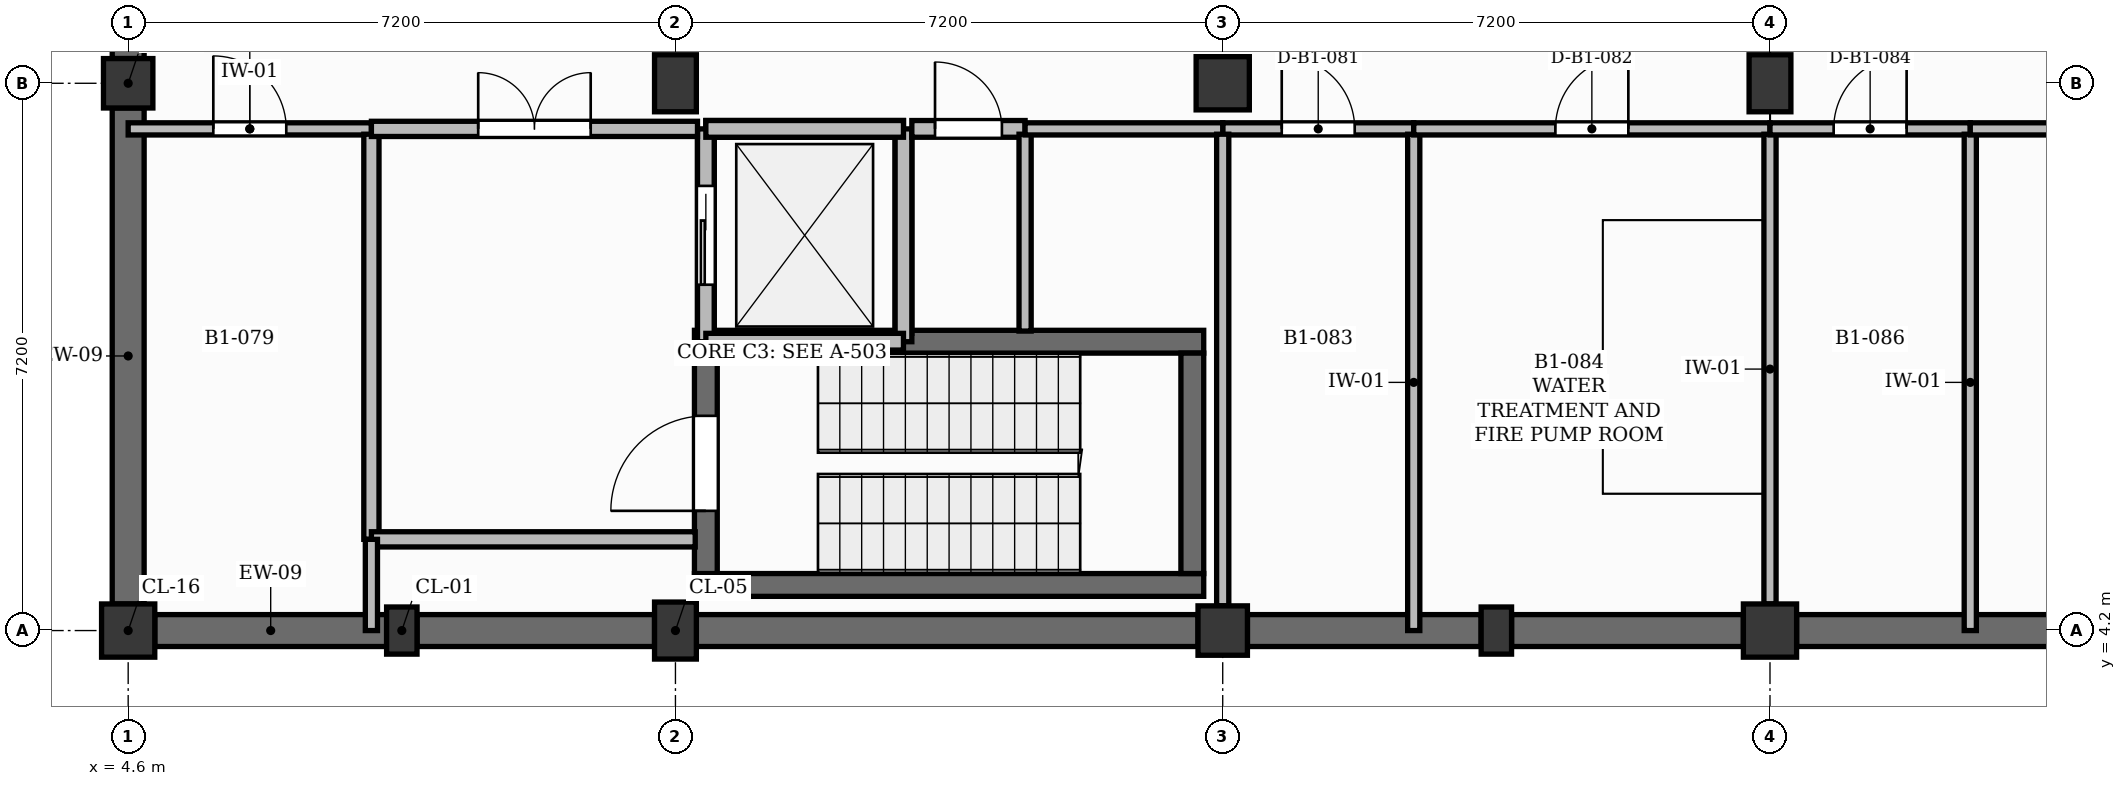
"""IFC4 building model, lengths in metres.
Left out: names, types, materials, properties, quantities, classifications, styles, units other than length and angle.
Written with IfcOpenShell. Run it as: python <this file> out.ifc"""

import sys

from ifc_helpers import new_model, si_unit, direction, frame, frame_2d, origin, origin_2d, place, context, subcontext, project, spatial, rectangle, extrude, element, fill, save


model = new_model("IFC4")
c1 = context("Model", 3, precision=1e-05, world=origin(), true_north=direction((0.0, 1.0)))
c2 = subcontext(c1, "Body", "Model", "MODEL_VIEW")
j1 = project(units=[si_unit("LENGTHUNIT", "METRE"), si_unit("PLANEANGLEUNIT", "RADIAN")], contexts=[c1])
p1 = place(None, origin())
s1 = spatial("IfcSite", under=j1, at=p1, CompositionType="ELEMENT")
p2 = place(p1, origin())
s2 = spatial("IfcBuilding", under=s1, at=p2, CompositionType="ELEMENT")
p3 = place(p2, frame((0.0, 0.0, -4.5)))
s3 = spatial("IfcBuildingStorey", under=s2, at=p3, CompositionType="ELEMENT", Elevation=-4.5)
p4 = place(p3, frame((4.6, 4.2, 0.0), z_axis=(0.0, 0.0, 1.0), x_axis=(1.0, 0.0, 0.0)))
e1 = element("IfcColumn", 1, at=p4, inside=s3, PredefinedType="COLUMN", context=c2, shape_type="SweptSolid", body=[
    extrude(rectangle(XDim=0.7, YDim=0.7, at=origin_2d()), origin(), (0.0, 0.0, 1.0), 4.2),
])
p5 = place(p3, frame((4.6, 11.4, 0.0), z_axis=(0.0, 0.0, 1.0), x_axis=(1.0, 0.0, 0.0)))
e2 = element("IfcColumn", 2, at=p5, inside=s3, PredefinedType="COLUMN", context=c2, shape_type="SweptSolid", body=[
    extrude(rectangle(XDim=0.65, YDim=0.65, at=origin_2d()), origin(), (0.0, 0.0, 1.0), 4.2),
])
for number, where, z_axis, x_axis in (
    (3, (11.8, 4.2, 0.0), (0.0, 0.0, 1.0), (1.0, 0.0, 0.0)),
    (4, (11.8, 11.4, 0.0), (0.0, 0.0, 1.0), (1.0, 0.0, 0.0)),
):
    element("IfcColumn", number, at=place(p3, frame(where, z_axis=z_axis, x_axis=x_axis)), inside=s3, PredefinedType="COLUMN", context=c2, shape_type="SweptSolid", body=[
        extrude(rectangle(XDim=0.55, YDim=0.75, at=origin_2d()), origin(), (0.0, 0.0, 1.0), 4.2),
    ])
p6 = place(p3, frame((19.0, 4.2, 0.0), z_axis=(0.0, 0.0, 1.0), x_axis=(1.0, 0.0, 0.0)))
e5 = element("IfcColumn", 5, at=p6, inside=s3, PredefinedType="COLUMN", context=c2, shape_type="SweptSolid", body=[
    extrude(rectangle(XDim=0.65, YDim=0.65, at=origin_2d()), origin(), (0.0, 0.0, 1.0), 4.2),
])
for number, where, z_axis, x_axis in (
    (6, (19.0, 11.4, 0.0), (0.0, 0.0, 1.0), (1.0, 0.0, 0.0)),
    (7, (26.2, 4.2, 0.0), (0.0, 0.0, 1.0), (1.0, 0.0, 0.0)),
):
    element("IfcColumn", number, at=place(p3, frame(where, z_axis=z_axis, x_axis=x_axis)), inside=s3, PredefinedType="COLUMN", context=c2, shape_type="SweptSolid", body=[
        extrude(rectangle(XDim=0.7, YDim=0.7, at=origin_2d()), origin(), (0.0, 0.0, 1.0), 4.2),
    ])
p7 = place(p3, frame((26.2, 11.4, 0.0), z_axis=(0.0, 0.0, 1.0), x_axis=(1.0, 0.0, 0.0)))
e8 = element("IfcColumn", 8, at=p7, inside=s3, PredefinedType="COLUMN", context=c2, shape_type="SweptSolid", body=[
    extrude(rectangle(XDim=0.55, YDim=0.75, at=origin_2d()), origin(), (0.0, 0.0, 1.0), 4.2),
])
for number, where, z_axis, x_axis in (
    (9, (8.2, 4.2, 0.0), (0.0, 0.0, 1.0), (1.0, 0.0, 0.0)),
    (10, (22.6, 4.2, 0.0), (0.0, 0.0, 1.0), (1.0, 0.0, 0.0)),
):
    element("IfcColumn", number, at=place(p3, frame(where, z_axis=z_axis, x_axis=x_axis)), inside=s3, PredefinedType="PILASTER", context=c2, shape_type="SweptSolid", body=[
        extrude(rectangle(XDim=0.4, YDim=0.62, at=origin_2d()), origin(), (0.0, 0.0, 1.0), 4.2),
    ])
p8 = place(p3, frame((4.95, 4.2, 0.0), z_axis=(0.0, 0.0, 1.0), x_axis=(1.0, 0.0, 0.0)))
e11 = element("IfcWall", 11, at=p8, inside=s3, PredefinedType="USERDEFINED", context=c2, shape_type="SweptSolid", body=[
    extrude(rectangle(XDim=3.05, YDim=0.42, at=frame_2d((1.525, 0.0))), origin(), (0.0, 0.0, 1.0), 4.2),
])
p9 = place(p3, frame((8.4, 4.2, 0.0), z_axis=(0.0, 0.0, 1.0), x_axis=(1.0, 0.0, 0.0)))
e12 = element("IfcWall", 12, at=p9, inside=s3, PredefinedType="USERDEFINED", context=c2, shape_type="SweptSolid", body=[
    extrude(rectangle(XDim=3.125, YDim=0.42, at=frame_2d((1.562, 0.0))), origin(), (0.0, 0.0, 1.0), 4.2),
])
p10 = place(p3, frame((4.6, 4.55, 0.0), z_axis=(0.0, 0.0, 1.0), x_axis=(0.0, 1.0, 0.0)))
e13 = element("IfcWall", 13, at=p10, inside=s3, PredefinedType="USERDEFINED", context=c2, shape_type="SweptSolid", body=[
    extrude(rectangle(XDim=6.525, YDim=0.42, at=frame_2d((3.262, 0.0))), origin(), (0.0, 0.0, 1.0), 4.2),
])
p11 = place(p3, frame((4.6, 11.725, 0.0), z_axis=(0.0, 0.0, 1.0), x_axis=(0.0, 1.0, 0.0)))
e14 = element("IfcWall", 14, at=p11, inside=s3, PredefinedType="USERDEFINED", context=c2, shape_type="SweptSolid", body=[
    extrude(rectangle(XDim=6.55, YDim=0.42, at=frame_2d((3.275, 0.0))), origin(), (0.0, 0.0, 1.0), 4.2),
])
p12 = place(p3, frame((12.075, 4.2, 0.0), z_axis=(0.0, 0.0, 1.0), x_axis=(1.0, 0.0, 0.0)))
e15 = element("IfcWall", 15, at=p12, inside=s3, PredefinedType="USERDEFINED", context=c2, shape_type="SweptSolid", body=[
    extrude(rectangle(XDim=6.6, YDim=0.42, at=frame_2d((3.3, 0.0))), origin(), (0.0, 0.0, 1.0), 4.2),
])
p13 = place(p3, frame((19.325, 4.2, 0.0), z_axis=(0.0, 0.0, 1.0), x_axis=(1.0, 0.0, 0.0)))
e16 = element("IfcWall", 16, at=p13, inside=s3, PredefinedType="USERDEFINED", context=c2, shape_type="SweptSolid", body=[
    extrude(rectangle(XDim=3.075, YDim=0.42, at=frame_2d((1.538, 0.0))), origin(), (0.0, 0.0, 1.0), 4.2),
])
p14 = place(p3, frame((22.8, 4.2, 0.0), z_axis=(0.0, 0.0, 1.0), x_axis=(1.0, 0.0, 0.0)))
e17 = element("IfcWall", 17, at=p14, inside=s3, PredefinedType="USERDEFINED", context=c2, shape_type="SweptSolid", body=[
    extrude(rectangle(XDim=3.05, YDim=0.42, at=frame_2d((1.525, 0.0))), origin(), (0.0, 0.0, 1.0), 4.2),
])
p15 = place(p3, frame((26.55, 4.2, 0.0), z_axis=(0.0, 0.0, 1.0), x_axis=(1.0, 0.0, 0.0)))
e18 = element("IfcWall", 18, at=p15, inside=s3, PredefinedType="USERDEFINED", context=c2, shape_type="SweptSolid", body=[
    extrude(rectangle(XDim=6.525, YDim=0.42, at=frame_2d((3.262, 0.0))), origin(), (0.0, 0.0, 1.0), 4.2),
])
for number, where, z_axis, x_axis in (
    (19, (12.05, 4.8, 0.0), (0.0, 0.0, 1.0), (1.0, 0.0, 0.0)),
    (20, (12.05, 8.0, 0.0), (0.0, 0.0, 1.0), (1.0, 0.0, 0.0)),
):
    element("IfcWall", number, at=place(p3, frame(where, z_axis=z_axis, x_axis=x_axis)), inside=s3, PredefinedType="SHEAR", context=c2, shape_type="SweptSolid", body=[
        extrude(rectangle(XDim=6.7, YDim=0.3, at=frame_2d((3.35, 0.0))), origin(), (0.0, 0.0, 1.0), 4.25),
    ])
p16 = place(p3, frame((12.2, 4.95, 0.0), z_axis=(0.0, 0.0, 1.0), x_axis=(0.0, 1.0, 0.0)))
e21 = element("IfcWall", 21, at=p16, inside=s3, PredefinedType="SHEAR", context=c2, shape_type="SweptSolid", body=[
    extrude(rectangle(XDim=2.9, YDim=0.3, at=frame_2d((1.45, 0.0))), origin(), (0.0, 0.0, 1.0), 4.25),
])
p17 = place(p16, frame((0.825, 0.0, 0.0)))
e22 = element("IfcOpeningElement", 22, at=p17, cuts=e21, PredefinedType="OPENING", context=c2, shape_type="SweptSolid", body=[
    extrude(rectangle(XDim=1.25, YDim=2.15, at=frame_2d((0.625, 1.075))), frame((0.0, 0.16, 0.0), z_axis=(0.0, -1.0, 0.0), x_axis=(1.0, 0.0, 0.0)), (0.0, 0.0, 1.0), 0.32),
])
p18 = place(p3, frame((18.6, 4.95, 0.0), z_axis=(0.0, 0.0, 1.0), x_axis=(0.0, 1.0, 0.0)))
e23 = element("IfcWall", 23, at=p18, inside=s3, PredefinedType="SHEAR", context=c2, shape_type="SweptSolid", body=[
    extrude(rectangle(XDim=2.9, YDim=0.3, at=frame_2d((1.45, 0.0))), origin(), (0.0, 0.0, 1.0), 4.25),
])
p19 = place(p3, frame((12.2, 10.8, 0.0), z_axis=(0.0, 0.0, 1.0), x_axis=(1.0, 0.0, 0.0)))
e24 = element("IfcWall", 24, at=p19, inside=s3, PredefinedType="SOLIDWALL", context=c2, shape_type="SweptSolid", body=[
    extrude(rectangle(XDim=2.6, YDim=0.22, at=frame_2d((1.3, 0.0))), origin(), (0.0, 0.0, 1.0), 4.25),
])
p20 = place(p3, frame((12.2, 8.11, 0.0), z_axis=(0.0, 0.0, 1.0), x_axis=(0.0, 1.0, 0.0)))
e25 = element("IfcWall", 25, at=p20, inside=s3, PredefinedType="SOLIDWALL", context=c2, shape_type="SweptSolid", body=[
    extrude(rectangle(XDim=2.58, YDim=0.22, at=frame_2d((1.29, 0.0))), origin(), (0.0, 0.0, 1.0), 4.25),
])
p21 = place(p20, frame((0.64, 0.0, 0.0)))
e26 = element("IfcOpeningElement", 26, at=p21, cuts=e25, PredefinedType="OPENING", context=c2, shape_type="SweptSolid", body=[
    extrude(rectangle(XDim=1.3, YDim=2.2, at=frame_2d((0.65, 1.1))), frame((0.0, 0.12, 0.0), z_axis=(0.0, -1.0, 0.0), x_axis=(1.0, 0.0, 0.0)), (0.0, 0.0, 1.0), 0.24),
])
p22 = place(p3, frame((14.8, 8.11, 0.0), z_axis=(0.0, 0.0, 1.0), x_axis=(0.0, 1.0, 0.0)))
e27 = element("IfcWall", 27, at=p22, inside=s3, PredefinedType="SOLIDWALL", context=c2, shape_type="SweptSolid", body=[
    extrude(rectangle(XDim=2.58, YDim=0.22, at=frame_2d((1.29, 0.0))), origin(), (0.0, 0.0, 1.0), 4.25),
])
for number, where, z_axis, x_axis in (
    (28, (12.2, 8.0, -0.9), (0.0, 0.0, 1.0), (0.0, 1.0, 0.0)),
    (29, (14.8, 8.0, -0.9), (0.0, 0.0, 1.0), (0.0, 1.0, 0.0)),
):
    element("IfcWall", number, at=place(p3, frame(where, z_axis=z_axis, x_axis=x_axis)), inside=s3, PredefinedType="SOLIDWALL", context=c2, shape_type="SweptSolid", body=[
        extrude(rectangle(XDim=2.8, YDim=0.22, at=frame_2d((1.4, 0.0))), origin(), (0.0, 0.0, 1.0), 0.9),
    ])
for number, where, z_axis, x_axis in (
    (30, (12.2, 8.0, -0.9), (0.0, 0.0, 1.0), (1.0, 0.0, 0.0)),
    (31, (12.2, 10.8, -0.9), (0.0, 0.0, 1.0), (1.0, 0.0, 0.0)),
):
    element("IfcWall", number, at=place(p3, frame(where, z_axis=z_axis, x_axis=x_axis)), inside=s3, PredefinedType="SOLIDWALL", context=c2, shape_type="SweptSolid", body=[
        extrude(rectangle(XDim=2.6, YDim=0.22, at=frame_2d((1.3, 0.0))), origin(), (0.0, 0.0, 1.0), 0.9),
    ])
p23 = place(p3, frame((4.6, 10.8, 0.0), z_axis=(0.0, 0.0, 1.0), x_axis=(1.0, 0.0, 0.0)))
e32 = element("IfcWall", 32, at=p23, inside=s3, PredefinedType="PARTITIONING", context=c2, shape_type="SweptSolid", body=[
    extrude(rectangle(XDim=3.2, YDim=0.16, at=frame_2d((1.6, 0.0))), origin(), (0.0, 0.0, 1.0), 4.08),
])
p24 = place(p23, frame((1.12, 0.0, 0.0)))
e33 = element("IfcOpeningElement", 33, at=p24, cuts=e32, PredefinedType="OPENING", context=c2, shape_type="SweptSolid", body=[
    extrude(rectangle(XDim=0.96, YDim=2.1, at=frame_2d((0.48, 1.05))), frame((0.0, 0.09, 0.0), z_axis=(0.0, -1.0, 0.0), x_axis=(1.0, 0.0, 0.0)), (0.0, 0.0, 1.0), 0.18),
])
p25 = place(p3, frame((7.8, 5.4, 0.0), z_axis=(0.0, 0.0, 1.0), x_axis=(0.0, 1.0, 0.0)))
e34 = element("IfcWall", 34, at=p25, inside=s3, PredefinedType="PARTITIONING", context=c2, shape_type="SweptSolid", body=[
    extrude(rectangle(XDim=5.33, YDim=0.2, at=frame_2d((2.665, 0.0))), origin(), (0.0, 0.0, 1.0), 4.08),
])
p26 = place(p3, frame((7.8, 10.8, 0.0), z_axis=(0.0, 0.0, 1.0), x_axis=(1.0, 0.0, 0.0)))
e35 = element("IfcWall", 35, at=p26, inside=s3, PredefinedType="PARTITIONING", context=c2, shape_type="SweptSolid", body=[
    extrude(rectangle(XDim=4.29, YDim=0.2, at=frame_2d((2.145, 0.0))), origin(), (0.0, 0.0, 1.0), 4.08),
])
p27 = place(p26, frame((1.405, 0.0, 0.0)))
e36 = element("IfcOpeningElement", 36, at=p27, cuts=e35, PredefinedType="OPENING", context=c2, shape_type="SweptSolid", body=[
    extrude(rectangle(XDim=1.48, YDim=2.25, at=frame_2d((0.74, 1.125))), frame((0.0, 0.11, 0.0), z_axis=(0.0, -1.0, 0.0), x_axis=(1.0, 0.0, 0.0)), (0.0, 0.0, 1.0), 0.22),
])
p28 = place(p3, frame((14.91, 10.8, 0.0), z_axis=(0.0, 0.0, 1.0), x_axis=(1.0, 0.0, 0.0)))
e37 = element("IfcWall", 37, at=p28, inside=s3, PredefinedType="SOLIDWALL", context=c2, shape_type="SweptSolid", body=[
    extrude(rectangle(XDim=1.49, YDim=0.22, at=frame_2d((0.745, 0.0))), origin(), (0.0, 0.0, 1.0), 4.08),
])
p29 = place(p28, frame((0.305, 0.0, 0.0)))
e38 = element("IfcOpeningElement", 38, at=p29, cuts=e37, PredefinedType="OPENING", context=c2, shape_type="SweptSolid", body=[
    extrude(rectangle(XDim=0.88, YDim=2.05, at=frame_2d((0.44, 1.025))), frame((0.0, 0.12, 0.0), z_axis=(0.0, -1.0, 0.0), x_axis=(1.0, 0.0, 0.0)), (0.0, 0.0, 1.0), 0.24),
])
p30 = place(p3, frame((19.0, 10.8, 0.0), z_axis=(0.0, 0.0, 1.0), x_axis=(1.0, 0.0, 0.0)))
e39 = element("IfcWall", 39, at=p30, inside=s3, PredefinedType="PARTITIONING", context=c2, shape_type="SweptSolid", body=[
    extrude(rectangle(XDim=2.513, YDim=0.16, at=frame_2d((1.256, 0.0))), origin(), (0.0, 0.0, 1.0), 4.08),
])
p31 = place(p30, frame((0.777, 0.0, 0.0)))
e40 = element("IfcOpeningElement", 40, at=p31, cuts=e39, PredefinedType="OPENING", context=c2, shape_type="SweptSolid", body=[
    extrude(rectangle(XDim=0.96, YDim=2.1, at=frame_2d((0.48, 1.05))), frame((0.0, 0.09, 0.0), z_axis=(0.0, -1.0, 0.0), x_axis=(1.0, 0.0, 0.0)), (0.0, 0.0, 1.0), 0.18),
])
p32 = place(p3, frame((21.513, 4.2, 0.0), z_axis=(0.0, 0.0, 1.0), x_axis=(0.0, 1.0, 0.0)))
e41 = element("IfcWall", 41, at=p32, inside=s3, PredefinedType="PARTITIONING", context=c2, shape_type="SweptSolid", body=[
    extrude(rectangle(XDim=6.53, YDim=0.16, at=frame_2d((3.265, 0.0))), origin(), (0.0, 0.0, 1.0), 4.08),
])
p33 = place(p3, frame((21.513, 10.8, 0.0), z_axis=(0.0, 0.0, 1.0), x_axis=(1.0, 0.0, 0.0)))
e42 = element("IfcWall", 42, at=p33, inside=s3, PredefinedType="PARTITIONING", context=c2, shape_type="SweptSolid", body=[
    extrude(rectangle(XDim=4.687, YDim=0.16, at=frame_2d((2.344, 0.0))), origin(), (0.0, 0.0, 1.0), 4.08),
])
p34 = place(p33, frame((1.864, 0.0, 0.0)))
e43 = element("IfcOpeningElement", 43, at=p34, cuts=e42, PredefinedType="OPENING", context=c2, shape_type="SweptSolid", body=[
    extrude(rectangle(XDim=0.96, YDim=2.1, at=frame_2d((0.48, 1.05))), frame((0.0, 0.09, 0.0), z_axis=(0.0, -1.0, 0.0), x_axis=(1.0, 0.0, 0.0)), (0.0, 0.0, 1.0), 0.18),
])
p35 = place(p3, frame((26.2, 4.55, 0.0), z_axis=(0.0, 0.0, 1.0), x_axis=(0.0, 1.0, 0.0)))
e44 = element("IfcWall", 44, at=p35, inside=s3, PredefinedType="PARTITIONING", context=c2, shape_type="SweptSolid", body=[
    extrude(rectangle(XDim=6.18, YDim=0.16, at=frame_2d((3.09, 0.0))), origin(), (0.0, 0.0, 1.0), 3.5),
])
p36 = place(p3, frame((26.2, 10.8, 0.0), z_axis=(0.0, 0.0, 1.0), x_axis=(1.0, 0.0, 0.0)))
e45 = element("IfcWall", 45, at=p36, inside=s3, PredefinedType="PARTITIONING", context=c2, shape_type="SweptSolid", body=[
    extrude(rectangle(XDim=2.635, YDim=0.16, at=frame_2d((1.317, 0.0))), origin(), (0.0, 0.0, 1.0), 4.08),
])
p37 = place(p36, frame((0.837, 0.0, 0.0)))
e46 = element("IfcOpeningElement", 46, at=p37, cuts=e45, PredefinedType="OPENING", context=c2, shape_type="SweptSolid", body=[
    extrude(rectangle(XDim=0.96, YDim=2.1, at=frame_2d((0.48, 1.05))), frame((0.0, 0.09, 0.0), z_axis=(0.0, -1.0, 0.0), x_axis=(1.0, 0.0, 0.0)), (0.0, 0.0, 1.0), 0.18),
])
p38 = place(p3, frame((28.835, 4.2, 0.0), z_axis=(0.0, 0.0, 1.0), x_axis=(0.0, 1.0, 0.0)))
e47 = element("IfcWall", 47, at=p38, inside=s3, PredefinedType="PARTITIONING", context=c2, shape_type="SweptSolid", body=[
    extrude(rectangle(XDim=6.53, YDim=0.16, at=frame_2d((3.265, 0.0))), origin(), (0.0, 0.0, 1.0), 4.08),
])
p39 = place(p3, frame((28.835, 10.8, 0.0), z_axis=(0.0, 0.0, 1.0), x_axis=(1.0, 0.0, 0.0)))
e48 = element("IfcWall", 48, at=p39, inside=s3, PredefinedType="PARTITIONING", context=c2, shape_type="SweptSolid", body=[
    extrude(rectangle(XDim=4.565, YDim=0.16, at=frame_2d((2.282, 0.0))), origin(), (0.0, 0.0, 1.0), 4.08),
])
p40 = place(p39, frame((1.802, 0.0, 0.0)))
e49 = element("IfcOpeningElement", 49, at=p40, cuts=e48, PredefinedType="OPENING", context=c2, shape_type="SweptSolid", body=[
    extrude(rectangle(XDim=0.96, YDim=2.1, at=frame_2d((0.48, 1.05))), frame((0.0, 0.09, 0.0), z_axis=(0.0, -1.0, 0.0), x_axis=(1.0, 0.0, 0.0)), (0.0, 0.0, 1.0), 0.18),
])
p41 = place(p3, frame((16.4, 8.14, 0.0), z_axis=(0.0, 0.0, 1.0), x_axis=(0.0, 1.0, 0.0)))
e50 = element("IfcWall", 50, at=p41, inside=s3, PredefinedType="PARTITIONING", context=c2, shape_type="SweptSolid", body=[
    extrude(rectangle(XDim=2.59, YDim=0.16, at=frame_2d((1.295, 0.0))), origin(), (0.0, 0.0, 1.0), 4.08),
])
p42 = place(p3, frame((7.8, 5.4, 0.0), z_axis=(0.0, 0.0, 1.0), x_axis=(1.0, 0.0, 0.0)))
e51 = element("IfcWall", 51, at=p42, inside=s3, PredefinedType="PARTITIONING", context=c2, shape_type="SweptSolid", body=[
    extrude(rectangle(XDim=4.26, YDim=0.2, at=frame_2d((2.13, 0.0))), origin(), (0.0, 0.0, 1.0), 4.08),
])
p43 = place(p3, frame((16.4, 10.8, 0.0), z_axis=(0.0, 0.0, 1.0), x_axis=(1.0, 0.0, 0.0)))
e52 = element("IfcWall", 52, at=p43, inside=s3, PredefinedType="PARTITIONING", context=c2, shape_type="SweptSolid", body=[
    extrude(rectangle(XDim=2.6, YDim=0.16, at=frame_2d((1.3, 0.0))), origin(), (0.0, 0.0, 1.0), 4.08),
])
p44 = place(p3, frame((7.8, 4.2, 0.0), z_axis=(0.0, 0.0, 1.0), x_axis=(0.0, 1.0, 0.0)))
e53 = element("IfcWall", 53, at=p44, inside=s3, PredefinedType="PARTITIONING", context=c2, shape_type="SweptSolid", body=[
    extrude(rectangle(XDim=1.2, YDim=0.16, at=frame_2d((0.6, 0.0))), origin(), (0.0, 0.0, 1.0), 4.08),
])
p45 = place(p3, frame((19.0, 4.525, 0.0), z_axis=(0.0, 0.0, 1.0), x_axis=(0.0, 1.0, 0.0)))
e54 = element("IfcWall", 54, at=p45, inside=s3, PredefinedType="PARTITIONING", context=c2, shape_type="SweptSolid", body=[
    extrude(rectangle(XDim=6.205, YDim=0.16, at=frame_2d((3.103, 0.0))), origin(), (0.0, 0.0, 1.0), 3.5),
])
p46 = place(p21, origin())
e55 = element("IfcDoor", 55, at=p46, inside=s3, OperationType="SLIDING_TO_LEFT", PredefinedType="DOOR", context=c2, shape_type="SweptSolid", body=[
    extrude(rectangle(XDim=1.3, YDim=2.2, at=frame_2d((0.65, 1.1))), frame((0.0, 0.025, 0.0), z_axis=(0.0, -1.0, 0.0), x_axis=(1.0, 0.0, 0.0)), (0.0, 0.0, 1.0), 0.05),
])
fill(e26, e55)
p47 = place(p17, origin())
e56 = element("IfcDoor", 56, at=p47, inside=s3, OperationType="SINGLE_SWING_LEFT", PredefinedType="DOOR", context=c2, shape_type="SweptSolid", body=[
    extrude(rectangle(XDim=1.25, YDim=2.15, at=frame_2d((0.625, 1.075))), frame((0.0, 0.025, 0.0), z_axis=(0.0, -1.0, 0.0), x_axis=(1.0, 0.0, 0.0)), (0.0, 0.0, 1.0), 0.05),
])
fill(e22, e56)
p48 = place(p27, origin())
e57 = element("IfcDoor", 57, at=p48, inside=s3, OperationType="DOUBLE_DOOR_SINGLE_SWING", PredefinedType="DOOR", context=c2, shape_type="SweptSolid", body=[
    extrude(rectangle(XDim=1.48, YDim=2.25, at=frame_2d((0.74, 1.125))), frame((0.0, 0.025, 0.0), z_axis=(0.0, -1.0, 0.0), x_axis=(1.0, 0.0, 0.0)), (0.0, 0.0, 1.0), 0.05),
])
fill(e36, e57)
p49 = place(p29, origin())
e58 = element("IfcDoor", 58, at=p49, inside=s3, OperationType="SINGLE_SWING_LEFT", PredefinedType="DOOR", context=c2, shape_type="SweptSolid", body=[
    extrude(rectangle(XDim=0.88, YDim=2.05, at=frame_2d((0.44, 1.025))), frame((0.0, 0.025, 0.0), z_axis=(0.0, -1.0, 0.0), x_axis=(1.0, 0.0, 0.0)), (0.0, 0.0, 1.0), 0.05),
])
fill(e38, e58)
p50 = place(p24, origin())
e59 = element("IfcDoor", 59, at=p50, inside=s3, OperationType="SINGLE_SWING_LEFT", PredefinedType="DOOR", context=c2, shape_type="SweptSolid", body=[
    extrude(rectangle(XDim=0.96, YDim=2.1, at=frame_2d((0.48, 1.05))), frame((0.0, 0.025, 0.0), z_axis=(0.0, -1.0, 0.0), x_axis=(1.0, 0.0, 0.0)), (0.0, 0.0, 1.0), 0.05),
])
fill(e33, e59)
p51 = place(p31, origin())
e60 = element("IfcDoor", 60, at=p51, inside=s3, OperationType="SINGLE_SWING_LEFT", PredefinedType="DOOR", context=c2, shape_type="SweptSolid", body=[
    extrude(rectangle(XDim=0.96, YDim=2.1, at=frame_2d((0.48, 1.05))), frame((0.0, 0.025, 0.0), z_axis=(0.0, -1.0, 0.0), x_axis=(1.0, 0.0, 0.0)), (0.0, 0.0, 1.0), 0.05),
])
fill(e40, e60)
p52 = place(p34, origin())
e61 = element("IfcDoor", 61, at=p52, inside=s3, OperationType="SINGLE_SWING_RIGHT", PredefinedType="DOOR", context=c2, shape_type="SweptSolid", body=[
    extrude(rectangle(XDim=0.96, YDim=2.1, at=frame_2d((0.48, 1.05))), frame((0.0, 0.025, 0.0), z_axis=(0.0, -1.0, 0.0), x_axis=(1.0, 0.0, 0.0)), (0.0, 0.0, 1.0), 0.05),
])
fill(e43, e61)
p53 = place(p37, origin())
e62 = element("IfcDoor", 62, at=p53, inside=s3, OperationType="SINGLE_SWING_RIGHT", PredefinedType="DOOR", context=c2, shape_type="SweptSolid", body=[
    extrude(rectangle(XDim=0.96, YDim=2.1, at=frame_2d((0.48, 1.05))), frame((0.0, 0.025, 0.0), z_axis=(0.0, -1.0, 0.0), x_axis=(1.0, 0.0, 0.0)), (0.0, 0.0, 1.0), 0.05),
])
fill(e46, e62)
save(model, sys.argv[1])
